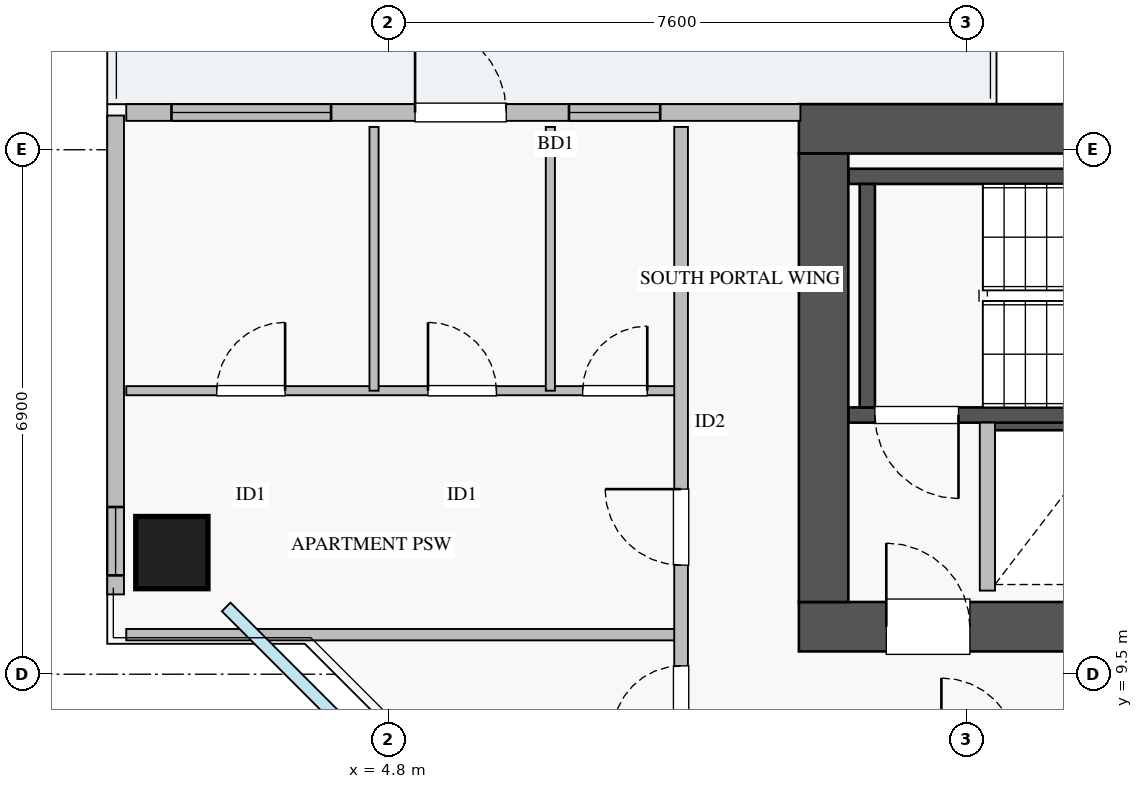
"""IFC4 building model, lengths in metres.
Left out: names, types, materials, properties, quantities, classifications, styles, units other than length and angle.
Written with IfcOpenShell. Run it as: python <this file> out.ifc"""

import sys

from ifc_helpers import new_model, si_unit, direction, frame, frame_2d, origin, origin_2d, place, context, subcontext, project, spatial, rectangle, extrude, source, transform, mapped, element, fill, save


model = new_model("IFC4")
c1 = context("Model", 3, precision=1e-05, world=origin(), true_north=direction((0.0, 1.0)))
c2 = subcontext(c1, "Body", "Model", "MODEL_VIEW")
j1 = project(units=[si_unit("LENGTHUNIT", "METRE"), si_unit("PLANEANGLEUNIT", "RADIAN")], contexts=[c1])
p1 = place(None, origin())
s1 = spatial("IfcSite", under=j1, at=p1, CompositionType="ELEMENT")
p2 = place(p1, origin())
s2 = spatial("IfcBuilding", under=s1, at=p2, CompositionType="ELEMENT")
p3 = place(p2, frame((0.0, 0.0, 153.5)))
s3 = spatial("IfcBuildingStorey", under=s2, at=p3, CompositionType="ELEMENT", Elevation=153.5)
p4 = place(p3, frame((12.68, 12.8, 0.0), z_axis=(0.0, 0.0, 1.0), x_axis=(1.0, 0.0, 0.0)))
e1 = element("IfcWall", 1, at=p4, inside=s3, PredefinedType="SHEAR", context=c2, shape_type="SweptSolid", body=[
    extrude(rectangle(XDim=1.94, YDim=0.18, at=frame_2d((0.97, 0.0))), origin(), (0.0, 0.0, 1.0), 3.07),
])
p5 = place(p3, frame((10.85, 12.91, 0.0), z_axis=(0.0, 0.0, 1.0), x_axis=(1.0, 0.0, 0.0)))
e2 = element("IfcWall", 2, at=p5, inside=s3, PredefinedType="SHEAR", context=c2, shape_type="SweptSolid", body=[
    extrude(rectangle(XDim=7.3, YDim=0.2, at=frame_2d((3.65, 0.0))), origin(), (0.0, 0.0, 1.0), 3.25),
])
p6 = place(p5, frame((0.35, 0.0, 0.0)))
e3 = element("IfcOpeningElement", 3, at=p6, cuts=e2, PredefinedType="OPENING", context=c2, shape_type="SweptSolid", body=[
    extrude(rectangle(XDim=1.1, YDim=2.05, at=frame_2d((0.55, 1.025))), frame((0.0, 0.11, 0.0), z_axis=(0.0, -1.0, 0.0), x_axis=(1.0, 0.0, 0.0)), (0.0, 0.0, 1.0), 0.22),
])
p7 = place(p3, frame((10.85, 16.05, 0.0), z_axis=(0.0, 0.0, 1.0), x_axis=(1.0, 0.0, 0.0)))
e4 = element("IfcWall", 4, at=p7, inside=s3, PredefinedType="SHEAR", context=c2, shape_type="SweptSolid", body=[
    extrude(rectangle(XDim=7.3, YDim=0.2, at=frame_2d((3.65, 0.0))), origin(), (0.0, 0.0, 1.0), 3.25),
])
p8 = place(p3, frame((11.1, 13.01, 0.0), z_axis=(0.0, 0.0, 1.0), x_axis=(0.0, 1.0, 0.0)))
e5 = element("IfcWall", 5, at=p8, inside=s3, PredefinedType="SHEAR", context=c2, shape_type="SweptSolid", body=[
    extrude(rectangle(XDim=2.94, YDim=0.2, at=frame_2d((1.47, 0.0))), origin(), (0.0, 0.0, 1.0), 3.25),
])
p9 = place(p3, frame((10.2, 10.125, 0.0), z_axis=(0.0, 0.0, 1.0), x_axis=(1.0, 0.0, 0.0)))
e6 = element("IfcWall", 6, at=p9, inside=s3, PredefinedType="SHEAR", context=c2, shape_type="SweptSolid", body=[
    extrude(rectangle(XDim=17.6, YDim=0.65, at=frame_2d((8.8, 0.0))), origin(), (0.0, 0.0, 1.0), 3.25),
])
p10 = place(p9, frame((1.15, 0.0, 0.0)))
e7 = element("IfcOpeningElement", 7, at=p10, cuts=e6, PredefinedType="OPENING", context=c2, shape_type="SweptSolid", body=[
    extrude(rectangle(XDim=1.1, YDim=2.05, at=frame_2d((0.55, 1.025))), frame((0.0, 0.335, 0.0), z_axis=(0.0, -1.0, 0.0), x_axis=(1.0, 0.0, 0.0)), (0.0, 0.0, 1.0), 0.67),
])
p11 = place(p9, frame((8.3, 0.0, 0.0)))
e8 = element("IfcOpeningElement", 8, at=p11, cuts=e6, PredefinedType="OPENING", context=c2, shape_type="SweptSolid", body=[
    extrude(rectangle(XDim=1.1, YDim=2.05, at=frame_2d((0.55, 1.025))), frame((0.0, 0.335, 0.0), z_axis=(0.0, -1.0, 0.0), x_axis=(1.0, 0.0, 0.0)), (0.0, 0.0, 1.0), 0.67),
])
p12 = place(p9, frame((4.9, 0.0, 0.0)))
e9 = element("IfcOpeningElement", 9, at=p12, cuts=e6, PredefinedType="OPENING", context=c2, shape_type="SweptSolid", body=[
    extrude(rectangle(XDim=1.1, YDim=2.05, at=frame_2d((0.55, 1.025))), frame((0.0, 0.335, 0.0), z_axis=(0.0, -1.0, 0.0), x_axis=(1.0, 0.0, 0.0)), (0.0, 0.0, 1.0), 0.67),
])
p13 = place(p9, frame((14.74, 0.0, 0.0)))
e10 = element("IfcOpeningElement", 10, at=p13, cuts=e6, PredefinedType="OPENING", context=c2, shape_type="SweptSolid", body=[
    extrude(rectangle(XDim=1.0, YDim=2.05, at=frame_2d((0.5, 1.025))), frame((0.0, 0.335, 0.0), z_axis=(0.0, -1.0, 0.0), x_axis=(1.0, 0.0, 0.0)), (0.0, 0.0, 1.0), 0.67),
])
p14 = place(p9, frame((10.155, 0.0, 0.0)))
e11 = element("IfcOpeningElement", 11, at=p14, cuts=e6, PredefinedType="OPENING", context=c2, shape_type="SweptSolid", body=[
    extrude(rectangle(XDim=1.0, YDim=2.05, at=frame_2d((0.5, 1.025))), frame((0.0, 0.335, 0.0), z_axis=(0.0, -1.0, 0.0), x_axis=(1.0, 0.0, 0.0)), (0.0, 0.0, 1.0), 0.67),
])
p15 = place(p9, frame((11.87, 0.0, 0.0)))
e12 = element("IfcOpeningElement", 12, at=p15, cuts=e6, PredefinedType="OPENING", context=c2, shape_type="SweptSolid", body=[
    extrude(rectangle(XDim=1.0, YDim=2.05, at=frame_2d((0.5, 1.025))), frame((0.0, 0.335, 0.0), z_axis=(0.0, -1.0, 0.0), x_axis=(1.0, 0.0, 0.0)), (0.0, 0.0, 1.0), 0.67),
])
p16 = place(p9, frame((13.46, 0.0, 0.0)))
e13 = element("IfcOpeningElement", 13, at=p16, cuts=e6, PredefinedType="OPENING", context=c2, shape_type="SweptSolid", body=[
    extrude(rectangle(XDim=1.0, YDim=2.05, at=frame_2d((0.5, 1.025))), frame((0.0, 0.335, 0.0), z_axis=(0.0, -1.0, 0.0), x_axis=(1.0, 0.0, 0.0)), (0.0, 0.0, 1.0), 0.67),
])
p17 = place(p3, frame((10.2, 16.675, 0.0), z_axis=(0.0, 0.0, 1.0), x_axis=(1.0, 0.0, 0.0)))
e14 = element("IfcWall", 14, at=p17, inside=s3, PredefinedType="SHEAR", context=c2, shape_type="SweptSolid", body=[
    extrude(rectangle(XDim=17.6, YDim=0.65, at=frame_2d((8.8, 0.0))), origin(), (0.0, 0.0, 1.0), 3.25),
])
p18 = place(p3, frame((10.525, 10.45, 0.0), z_axis=(0.0, 0.0, 1.0), x_axis=(0.0, 1.0, 0.0)))
e15 = element("IfcWall", 15, at=p18, inside=s3, PredefinedType="SHEAR", context=c2, shape_type="SweptSolid", body=[
    extrude(rectangle(XDim=5.9, YDim=0.65, at=frame_2d((2.95, 0.0))), origin(), (0.0, 0.0, 1.0), 3.25),
])
m1 = source(origin(), c2, "Body", "SweptSolid", [
    extrude(rectangle(XDim=0.95, YDim=0.95, at=origin_2d()), origin(), (0.0, 0.0, 1.0), 3.25),
])
p19 = place(p3, frame((1.95, 11.1, 0.0), z_axis=(0.0, 0.0, 1.0), x_axis=(1.0, 0.0, 0.0)))
e16 = element("IfcColumn", 16, at=p19, inside=s3, PredefinedType="COLUMN", context=c2, shape_type="MappedRepresentation", body=[
    mapped(m1, transform((0.0, 0.0, 0.0), x_axis=(1.0, 0.0, 0.0), y_axis=(0.0, 1.0, 0.0), z_axis=(0.0, 0.0, 1.0), scale=1.0)),
])
p20 = place(p3, frame((1.35, 16.89, 0.0), z_axis=(0.0, 0.0, 1.0), x_axis=(1.0, 0.0, 0.0)))
e17 = element("IfcWall", 17, at=p20, inside=s3, PredefinedType="STANDARD", context=c2, shape_type="SweptSolid", body=[
    extrude(rectangle(XDim=8.87, YDim=0.22, at=frame_2d((4.435, 0.0))), origin(), (0.0, 0.0, 1.0), 2.61),
])
p21 = place(p20, frame((3.8, 0.0, 0.0)))
e18 = element("IfcOpeningElement", 18, at=p21, cuts=e17, PredefinedType="OPENING", context=c2, shape_type="SweptSolid", body=[
    extrude(rectangle(XDim=1.2, YDim=2.1, at=frame_2d((0.6, 1.05))), frame((0.0, 0.12, 0.0), z_axis=(0.0, -1.0, 0.0), x_axis=(1.0, 0.0, 0.0)), (0.0, 0.0, 1.0), 0.24),
])
p22 = place(p20, frame((0.595, 0.0, 0.9)))
e19 = element("IfcOpeningElement", 19, at=p22, cuts=e17, PredefinedType="OPENING", context=c2, shape_type="SweptSolid", body=[
    extrude(rectangle(XDim=2.1, YDim=1.5, at=frame_2d((1.05, 0.75))), frame((0.0, 0.12, 0.0), z_axis=(0.0, -1.0, 0.0), x_axis=(1.0, 0.0, 0.0)), (0.0, 0.0, 1.0), 0.24),
])
p23 = place(p20, frame((5.825, 0.0, 0.9)))
e20 = element("IfcOpeningElement", 20, at=p23, cuts=e17, PredefinedType="OPENING", context=c2, shape_type="SweptSolid", body=[
    extrude(rectangle(XDim=1.2, YDim=1.4, at=frame_2d((0.6, 0.7))), frame((0.0, 0.12, 0.0), z_axis=(0.0, -1.0, 0.0), x_axis=(1.0, 0.0, 0.0)), (0.0, 0.0, 1.0), 0.24),
])
p24 = place(p3, frame((1.21, 10.55, 0.0), z_axis=(0.0, 0.0, 1.0), x_axis=(0.0, 1.0, 0.0)))
e21 = element("IfcWall", 21, at=p24, inside=s3, PredefinedType="STANDARD", context=c2, shape_type="SweptSolid", body=[
    extrude(rectangle(XDim=6.3, YDim=0.22, at=frame_2d((3.15, 0.0))), origin(), (0.0, 0.0, 1.0), 2.61),
])
p25 = place(p24, frame((0.25, 0.0, 0.9)))
e22 = element("IfcOpeningElement", 22, at=p25, cuts=e21, PredefinedType="OPENING", context=c2, shape_type="SweptSolid", body=[
    extrude(rectangle(XDim=0.9, YDim=1.2, at=frame_2d((0.45, 0.6))), frame((0.0, 0.12, 0.0), z_axis=(0.0, -1.0, 0.0), x_axis=(1.0, 0.0, 0.0)), (0.0, 0.0, 1.0), 0.24),
])
p26 = place(p3, frame((12.68, 10.6, 0.0), z_axis=(0.0, 0.0, 1.0), x_axis=(0.0, 1.0, 0.0)))
e23 = element("IfcWall", 23, at=p26, inside=s3, PredefinedType="PARTITIONING", context=c2, shape_type="SweptSolid", body=[
    extrude(rectangle(XDim=2.21, YDim=0.2, at=frame_2d((1.105, 0.0))), origin(), (0.0, 0.0, 1.0), 3.07),
])
p27 = place(p3, frame((1.35, 13.23, 0.0), z_axis=(0.0, 0.0, 1.0), x_axis=(1.0, 0.0, 0.0)))
e24 = element("IfcWall", 24, at=p27, inside=s3, PredefinedType="PLUMBINGWALL", context=c2, shape_type="SweptSolid", body=[
    extrude(rectangle(XDim=7.3, YDim=0.12, at=frame_2d((3.65, 0.0))), origin(), (0.0, 0.0, 1.0), 3.07),
])
p28 = place(p27, frame((1.19, 0.0, 0.0)))
e25 = element("IfcOpeningElement", 25, at=p28, cuts=e24, PredefinedType="OPENING", context=c2, shape_type="SweptSolid", body=[
    extrude(rectangle(XDim=0.9, YDim=2.05, at=frame_2d((0.45, 1.025))), frame((0.0, 0.07, 0.0), z_axis=(0.0, -1.0, 0.0), x_axis=(1.0, 0.0, 0.0)), (0.0, 0.0, 1.0), 0.14),
])
p29 = place(p27, frame((3.97, 0.0, 0.0)))
e26 = element("IfcOpeningElement", 26, at=p29, cuts=e24, PredefinedType="OPENING", context=c2, shape_type="SweptSolid", body=[
    extrude(rectangle(XDim=0.9, YDim=2.05, at=frame_2d((0.45, 1.025))), frame((0.0, 0.07, 0.0), z_axis=(0.0, -1.0, 0.0), x_axis=(1.0, 0.0, 0.0)), (0.0, 0.0, 1.0), 0.14),
])
p30 = place(p27, frame((6.005, 0.0, 0.0)))
e27 = element("IfcOpeningElement", 27, at=p30, cuts=e24, PredefinedType="OPENING", context=c2, shape_type="SweptSolid", body=[
    extrude(rectangle(XDim=0.85, YDim=2.05, at=frame_2d((0.425, 1.025))), frame((0.0, 0.07, 0.0), z_axis=(0.0, -1.0, 0.0), x_axis=(1.0, 0.0, 0.0)), (0.0, 0.0, 1.0), 0.14),
])
for number, where, z_axis, x_axis in (
    (28, (4.61, 13.23, 0.0), (0.0, 0.0, 1.0), (0.0, 1.0, 0.0)),
    (29, (6.93, 13.23, 0.0), (0.0, 0.0, 1.0), (0.0, 1.0, 0.0)),
):
    element("IfcWall", number, at=place(p3, frame(where, z_axis=z_axis, x_axis=x_axis)), inside=s3, PredefinedType="PLUMBINGWALL", context=c2, shape_type="SweptSolid", body=[
        extrude(rectangle(XDim=3.47, YDim=0.12, at=frame_2d((1.735, 0.0))), origin(), (0.0, 0.0, 1.0), 3.07),
    ])
p31 = place(p3, frame((1.35, 10.02, 0.0), z_axis=(0.0, 0.0, 1.0), x_axis=(1.0, 0.0, 0.0)))
e30 = element("IfcWall", 30, at=p31, inside=s3, PredefinedType="PARTITIONING", context=c2, shape_type="SweptSolid", body=[
    extrude(rectangle(XDim=7.3, YDim=0.15, at=frame_2d((3.65, 0.0))), origin(), (0.0, 0.0, 1.0), 3.07),
])
p32 = place(p3, frame((8.65, 5.35, 0.0), z_axis=(0.0, 0.0, 1.0), x_axis=(0.0, 1.0, 0.0)))
e31 = element("IfcWall", 31, at=p32, inside=s3, PredefinedType="PARTITIONING", context=c2, shape_type="SweptSolid", body=[
    extrude(rectangle(XDim=11.35, YDim=0.18, at=frame_2d((5.675, 0.0))), origin(), (0.0, 0.0, 1.0), 3.07),
])
p33 = place(p32, frame((3.36, 0.0, 0.0)))
e32 = element("IfcOpeningElement", 32, at=p33, cuts=e31, PredefinedType="OPENING", context=c2, shape_type="SweptSolid", body=[
    extrude(rectangle(XDim=0.9, YDim=2.05, at=frame_2d((0.45, 1.025))), frame((0.0, 0.1, 0.0), z_axis=(0.0, -1.0, 0.0), x_axis=(1.0, 0.0, 0.0)), (0.0, 0.0, 1.0), 0.2),
])
p34 = place(p32, frame((5.585, 0.0, 0.0)))
e33 = element("IfcOpeningElement", 33, at=p34, cuts=e31, PredefinedType="OPENING", context=c2, shape_type="SweptSolid", body=[
    extrude(rectangle(XDim=1.0, YDim=2.05, at=frame_2d((0.5, 1.025))), frame((0.0, 0.1, 0.0), z_axis=(0.0, -1.0, 0.0), x_axis=(1.0, 0.0, 0.0)), (0.0, 0.0, 1.0), 0.2),
])
m2 = source(origin(), c2, "Body", "SweptSolid", [
    extrude(rectangle(XDim=1.2, YDim=2.1, at=frame_2d((0.6, 1.05))), frame((0.0, 0.025, 0.0), z_axis=(0.0, -1.0, 0.0), x_axis=(1.0, 0.0, 0.0)), (0.0, 0.0, 1.0), 0.05),
])
p35 = place(p21, origin())
e34 = element("IfcDoor", 34, at=p35, inside=s3, OperationType="SINGLE_SWING_LEFT", PredefinedType="DOOR", context=c2, shape_type="MappedRepresentation", body=[
    mapped(m2, transform((0.0, 0.0, 0.0), x_axis=(1.0, 0.0, 0.0), y_axis=(0.0, 1.0, 0.0), z_axis=(0.0, 0.0, 1.0), scale=1.0)),
])
fill(e18, e34)
m3 = source(origin(), c2, "Body", "SweptSolid", [
    extrude(rectangle(XDim=2.1, YDim=1.5, at=frame_2d((1.05, 0.75))), frame((0.0, 0.03, 0.0), z_axis=(0.0, -1.0, 0.0), x_axis=(1.0, 0.0, 0.0)), (0.0, 0.0, 1.0), 0.06),
])
p36 = place(p22, origin())
e35 = element("IfcWindow", 35, at=p36, inside=s3, PartitioningType="TRIPLE_PANEL_VERTICAL", PredefinedType="WINDOW", context=c2, shape_type="MappedRepresentation", body=[
    mapped(m3, transform((0.0, 0.0, 0.0), x_axis=(1.0, 0.0, 0.0), y_axis=(0.0, 1.0, 0.0), z_axis=(0.0, 0.0, 1.0), scale=1.0)),
])
fill(e19, e35)
m4 = source(origin(), c2, "Body", "SweptSolid", [
    extrude(rectangle(XDim=1.2, YDim=1.4, at=frame_2d((0.6, 0.7))), frame((0.0, 0.03, 0.0), z_axis=(0.0, -1.0, 0.0), x_axis=(1.0, 0.0, 0.0)), (0.0, 0.0, 1.0), 0.06),
])
p37 = place(p23, origin())
e36 = element("IfcWindow", 36, at=p37, inside=s3, PartitioningType="TRIPLE_PANEL_VERTICAL", PredefinedType="WINDOW", context=c2, shape_type="MappedRepresentation", body=[
    mapped(m4, transform((0.0, 0.0, 0.0), x_axis=(1.0, 0.0, 0.0), y_axis=(0.0, 1.0, 0.0), z_axis=(0.0, 0.0, 1.0), scale=1.0)),
])
fill(e20, e36)
m5 = source(origin(), c2, "Body", "SweptSolid", [
    extrude(rectangle(XDim=1.1, YDim=2.05, at=frame_2d((0.55, 1.025))), frame((0.0, 0.025, 0.0), z_axis=(0.0, -1.0, 0.0), x_axis=(1.0, 0.0, 0.0)), (0.0, 0.0, 1.0), 0.05),
])
p38 = place(p10, origin())
e37 = element("IfcDoor", 37, at=p38, inside=s3, OperationType="SINGLE_SWING_LEFT", PredefinedType="DOOR", context=c2, shape_type="MappedRepresentation", body=[
    mapped(m5, transform((0.0, 0.0, 0.0), x_axis=(1.0, 0.0, 0.0), y_axis=(0.0, 1.0, 0.0), z_axis=(0.0, 0.0, 1.0), scale=1.0)),
])
fill(e7, e37)
p39 = place(p6, frame((1.1, 0.0, 0.0), z_axis=(0.0, 0.0, 1.0), x_axis=(-1.0, 0.0, 0.0)))
e38 = element("IfcDoor", 38, at=p39, inside=s3, OperationType="SINGLE_SWING_RIGHT", PredefinedType="DOOR", context=c2, shape_type="MappedRepresentation", body=[
    mapped(m5, transform((0.0, 0.0, 0.0), x_axis=(1.0, 0.0, 0.0), y_axis=(0.0, 1.0, 0.0), z_axis=(0.0, 0.0, 1.0), scale=1.0)),
])
fill(e3, e38)
m6 = source(origin(), c2, "Body", "SweptSolid", [
    extrude(rectangle(XDim=0.9, YDim=2.05, at=frame_2d((0.45, 1.025))), frame((0.0, 0.025, 0.0), z_axis=(0.0, -1.0, 0.0), x_axis=(1.0, 0.0, 0.0)), (0.0, 0.0, 1.0), 0.05),
])
p40 = place(p28, origin())
e39 = element("IfcDoor", 39, at=p40, inside=s3, OperationType="SINGLE_SWING_RIGHT", PredefinedType="DOOR", context=c2, shape_type="MappedRepresentation", body=[
    mapped(m6, transform((0.0, 0.0, 0.0), x_axis=(1.0, 0.0, 0.0), y_axis=(0.0, 1.0, 0.0), z_axis=(0.0, 0.0, 1.0), scale=1.0)),
])
fill(e25, e39)
p41 = place(p29, origin())
e40 = element("IfcDoor", 40, at=p41, inside=s3, OperationType="SINGLE_SWING_LEFT", PredefinedType="DOOR", context=c2, shape_type="MappedRepresentation", body=[
    mapped(m6, transform((0.0, 0.0, 0.0), x_axis=(1.0, 0.0, 0.0), y_axis=(0.0, 1.0, 0.0), z_axis=(0.0, 0.0, 1.0), scale=1.0)),
])
fill(e26, e40)
m7 = source(origin(), c2, "Body", "SweptSolid", [
    extrude(rectangle(XDim=0.85, YDim=2.05, at=frame_2d((0.425, 1.025))), frame((0.0, 0.025, 0.0), z_axis=(0.0, -1.0, 0.0), x_axis=(1.0, 0.0, 0.0)), (0.0, 0.0, 1.0), 0.05),
])
p42 = place(p30, origin())
e41 = element("IfcDoor", 41, at=p42, inside=s3, OperationType="SINGLE_SWING_RIGHT", PredefinedType="DOOR", context=c2, shape_type="MappedRepresentation", body=[
    mapped(m7, transform((0.0, 0.0, 0.0), x_axis=(1.0, 0.0, 0.0), y_axis=(0.0, 1.0, 0.0), z_axis=(0.0, 0.0, 1.0), scale=1.0)),
])
fill(e27, e41)
p43 = place(p33, origin())
e42 = element("IfcDoor", 42, at=p43, inside=s3, OperationType="SINGLE_SWING_LEFT", PredefinedType="DOOR", context=c2, shape_type="MappedRepresentation", body=[
    mapped(m6, transform((0.0, 0.0, 0.0), x_axis=(1.0, 0.0, 0.0), y_axis=(0.0, 1.0, 0.0), z_axis=(0.0, 0.0, 1.0), scale=1.0)),
])
fill(e32, e42)
m8 = source(origin(), c2, "Body", "SweptSolid", [
    extrude(rectangle(XDim=1.0, YDim=2.05, at=frame_2d((0.5, 1.025))), frame((0.0, 0.025, 0.0), z_axis=(0.0, -1.0, 0.0), x_axis=(1.0, 0.0, 0.0)), (0.0, 0.0, 1.0), 0.05),
])
p44 = place(p34, origin())
e43 = element("IfcDoor", 43, at=p44, inside=s3, OperationType="SINGLE_SWING_RIGHT", PredefinedType="DOOR", context=c2, shape_type="MappedRepresentation", body=[
    mapped(m8, transform((0.0, 0.0, 0.0), x_axis=(1.0, 0.0, 0.0), y_axis=(0.0, 1.0, 0.0), z_axis=(0.0, 0.0, 1.0), scale=1.0)),
])
fill(e33, e43)
m9 = source(origin(), c2, "Body", "SweptSolid", [
    extrude(rectangle(XDim=0.9, YDim=1.2, at=frame_2d((0.45, 0.6))), frame((0.0, 0.03, 0.0), z_axis=(0.0, -1.0, 0.0), x_axis=(1.0, 0.0, 0.0)), (0.0, 0.0, 1.0), 0.06),
])
p45 = place(p25, origin())
e44 = element("IfcWindow", 44, at=p45, inside=s3, PartitioningType="SINGLE_PANEL", PredefinedType="WINDOW", context=c2, shape_type="MappedRepresentation", body=[
    mapped(m9, transform((0.0, 0.0, 0.0), x_axis=(1.0, 0.0, 0.0), y_axis=(0.0, 1.0, 0.0), z_axis=(0.0, 0.0, 1.0), scale=1.0)),
])
fill(e22, e44)
save(model, sys.argv[1])
